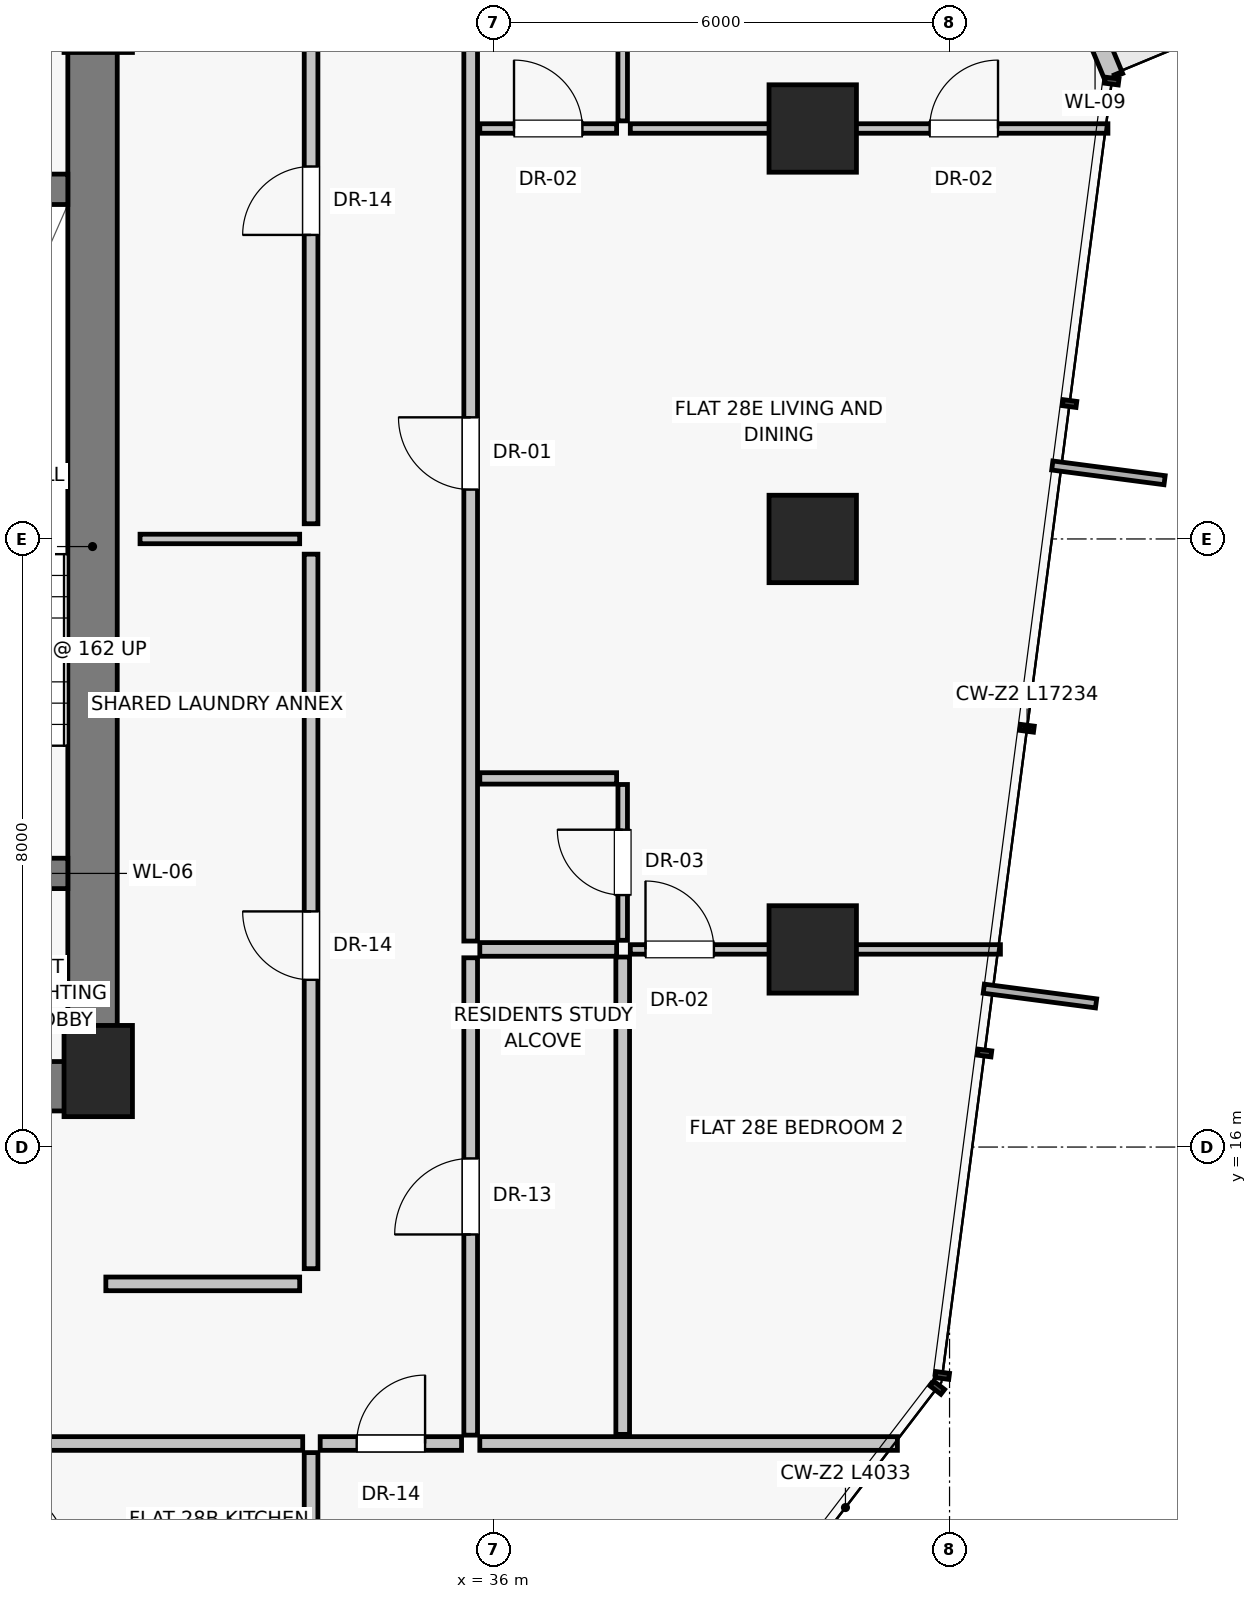
"""IFC4 building model, lengths in metres.
Left out: names, types, materials, properties, quantities, classifications, styles, units other than length and angle.
Written with IfcOpenShell. Run it as: python <this file> out.ifc"""

import sys

from ifc_helpers import new_model, si_unit, direction, frame, frame_2d, origin, origin_2d, place, context, subcontext, project, spatial, rectangle, extrude, source, transform, mapped, element, fill, save


model = new_model("IFC4")
c1 = context("Model", 3, precision=1e-05, world=origin(), true_north=direction((0.0, 1.0)))
c2 = subcontext(c1, "Body", "Model", "MODEL_VIEW")
j1 = project(units=[si_unit("LENGTHUNIT", "METRE"), si_unit("PLANEANGLEUNIT", "RADIAN")], contexts=[c1])
p1 = place(None, origin())
s1 = spatial("IfcSite", under=j1, at=p1, CompositionType="ELEMENT")
p2 = place(p1, origin())
s2 = spatial("IfcBuilding", under=s1, at=p2, CompositionType="ELEMENT")
p3 = place(p2, frame((0.0, 0.0, 102.45)))
s3 = spatial("IfcBuildingStorey", under=s2, at=p3, CompositionType="ELEMENT", Elevation=102.45)
p4 = place(p3, frame((30.8, 17.0, 0.0), z_axis=(0.0, 0.0, 1.0), x_axis=(1.0, 0.0, 0.0)))
e1 = element("IfcColumn", 1, at=p4, inside=s3, PredefinedType="PILASTER", context=c2, shape_type="SweptSolid", body=[
    extrude(rectangle(XDim=0.9, YDim=1.2, at=origin_2d()), origin(), (0.0, 0.0, 1.0), 3.25),
])
for number, where, z_axis, x_axis in (
    (2, (40.2, 18.6, 0.0), (0.0, 0.0, 1.0), (1.0, 0.0, 0.0)),
    (3, (40.2, 24.0, 0.0), (0.0, 0.0, 1.0), (1.0, 0.0, 0.0)),
    (4, (40.2, 29.4, 0.0), (0.0, 0.0, 1.0), (1.0, 0.0, 0.0)),
):
    element("IfcColumn", number, at=place(p3, frame(where, z_axis=z_axis, x_axis=x_axis)), inside=s3, PredefinedType="COLUMN", context=c2, shape_type="SweptSolid", body=[
        extrude(rectangle(XDim=1.15, YDim=1.15, at=origin_2d()), origin(), (0.0, 0.0, 1.0), 3.25),
    ])
p5 = place(p3, frame((44.162, 30.076, 0.0), z_axis=(0.0, 0.0, 1.0), x_axis=(-0.383361891247, 0.923598213694, 0.0)))
e5 = element("IfcWall", 5, at=p5, inside=s3, PredefinedType="SOLIDWALL", context=c2, shape_type="SweptSolid", body=[
    extrude(rectangle(XDim=4.233, YDim=0.25, at=frame_2d((2.117, 0.0))), origin(), (0.0, 0.0, 1.0), 3.0),
])
p6 = place(p5, frame((1.542, 0.0, 0.0)))
e6 = element("IfcOpeningElement", 6, at=p6, cuts=e5, PredefinedType="OPENING", context=c2, shape_type="SweptSolid", body=[
    extrude(rectangle(XDim=1.15, YDim=2.25, at=frame_2d((0.575, 1.125))), frame((0.0, 0.135, 0.0), z_axis=(0.0, -1.0, 0.0), x_axis=(1.0, 0.0, 0.0)), (0.0, 0.0, 1.0), 0.27),
])
p7 = place(p3, frame((30.725, 16.8, 0.0), z_axis=(0.0, 0.0, 1.0), x_axis=(0.0, 1.0, 0.0)))
e7 = element("IfcWall", 7, at=p7, inside=s3, PredefinedType="SHEAR", context=c2, shape_type="SweptSolid", body=[
    extrude(rectangle(XDim=14.2, YDim=0.65, at=frame_2d((7.1, 0.0))), origin(), (0.0, 0.0, 1.0), 3.0),
])
p8 = place(p3, frame((24.95, 16.8, 0.0), z_axis=(0.0, 0.0, 1.0), x_axis=(1.0, 0.0, 0.0)))
e8 = element("IfcWall", 8, at=p8, inside=s3, PredefinedType="SHEAR", context=c2, shape_type="SweptSolid", body=[
    extrude(rectangle(XDim=5.85, YDim=0.65, at=frame_2d((2.925, 0.0))), origin(), (0.0, 0.0, 1.0), 3.0),
])
p9 = place(p8, frame((2.15, 0.0, 0.0)))
e9 = element("IfcOpeningElement", 9, at=p9, cuts=e8, PredefinedType="OPENING", context=c2, shape_type="SweptSolid", body=[
    extrude(rectangle(XDim=1.2, YDim=2.03, at=frame_2d((0.6, 1.015))), frame((0.0, 0.335, 0.0), z_axis=(0.0, -1.0, 0.0), x_axis=(1.0, 0.0, 0.0)), (0.0, 0.0, 1.0), 0.67),
])
p10 = place(p3, frame((27.0, 19.6, 0.0), z_axis=(0.0, 0.0, 1.0), x_axis=(1.0, 0.0, 0.0)))
e10 = element("IfcWall", 10, at=p10, inside=s3, PredefinedType="SHEAR", context=c2, shape_type="SweptSolid", body=[
    extrude(rectangle(XDim=3.4, YDim=0.4, at=frame_2d((1.7, 0.0))), origin(), (0.0, 0.0, 1.0), 3.0),
])
p11 = place(p10, frame((1.05, 0.0, 0.0)))
e11 = element("IfcOpeningElement", 11, at=p11, cuts=e10, PredefinedType="OPENING", context=c2, shape_type="SweptSolid", body=[
    extrude(rectangle(XDim=1.1, YDim=2.03, at=frame_2d((0.55, 1.015))), frame((0.0, 0.21, 0.0), z_axis=(0.0, -1.0, 0.0), x_axis=(1.0, 0.0, 0.0)), (0.0, 0.0, 1.0), 0.42),
])
p12 = place(p3, frame((27.0, 28.6, 0.0), z_axis=(0.0, 0.0, 1.0), x_axis=(1.0, 0.0, 0.0)))
e12 = element("IfcWall", 12, at=p12, inside=s3, PredefinedType="SHEAR", context=c2, shape_type="SweptSolid", body=[
    extrude(rectangle(XDim=3.4, YDim=0.4, at=frame_2d((1.7, 0.0))), origin(), (0.0, 0.0, 1.0), 3.0),
])
p13 = place(p3, frame((33.6, 14.4, 0.0), z_axis=(0.0, 0.0, 1.0), x_axis=(0.0, 1.0, 0.0)))
e13 = element("IfcWall", 13, at=p13, inside=s3, PredefinedType="PARTITIONING", context=c2, shape_type="SweptSolid", body=[
    extrude(rectangle(XDim=9.4, YDim=0.18, at=frame_2d((4.7, 0.0))), origin(), (0.0, 0.0, 1.0), 3.0),
])
p14 = place(p13, frame((3.8, 0.0, 0.0)))
e14 = element("IfcOpeningElement", 14, at=p14, cuts=e13, PredefinedType="OPENING", context=c2, shape_type="SweptSolid", body=[
    extrude(rectangle(XDim=0.9, YDim=2.01, at=frame_2d((0.45, 1.005))), frame((0.0, 0.1, 0.0), z_axis=(0.0, -1.0, 0.0), x_axis=(1.0, 0.0, 0.0)), (0.0, 0.0, 1.0), 0.2),
])
p15 = place(p3, frame((33.6, 24.2, 0.0), z_axis=(0.0, 0.0, 1.0), x_axis=(0.0, 1.0, 0.0)))
e15 = element("IfcWall", 15, at=p15, inside=s3, PredefinedType="PARTITIONING", context=c2, shape_type="SweptSolid", body=[
    extrude(rectangle(XDim=9.2, YDim=0.18, at=frame_2d((4.6, 0.0))), origin(), (0.0, 0.0, 1.0), 3.0),
])
p16 = place(p15, frame((3.8, 0.0, 0.0)))
e16 = element("IfcOpeningElement", 16, at=p16, cuts=e15, PredefinedType="OPENING", context=c2, shape_type="SweptSolid", body=[
    extrude(rectangle(XDim=0.9, YDim=2.01, at=frame_2d((0.45, 1.005))), frame((0.0, 0.1, 0.0), z_axis=(0.0, -1.0, 0.0), x_axis=(1.0, 0.0, 0.0)), (0.0, 0.0, 1.0), 0.2),
])
p17 = place(p3, frame((31.35, 24.0, 0.0), z_axis=(0.0, 0.0, 1.0), x_axis=(1.0, 0.0, 0.0)))
e17 = element("IfcWall", 17, at=p17, inside=s3, PredefinedType="PARTITIONING", context=c2, shape_type="SweptSolid", body=[
    extrude(rectangle(XDim=2.1, YDim=0.125, at=frame_2d((1.05, 0.0))), origin(), (0.0, 0.0, 1.0), 3.0),
])
p18 = place(p3, frame((30.9, 14.2, 0.0), z_axis=(0.0, 0.0, 1.0), x_axis=(1.0, 0.0, 0.0)))
e18 = element("IfcWall", 18, at=p18, inside=s3, PredefinedType="PARTITIONING", context=c2, shape_type="SweptSolid", body=[
    extrude(rectangle(XDim=2.55, YDim=0.18, at=frame_2d((1.275, 0.0))), origin(), (0.0, 0.0, 1.0), 3.0),
])
p19 = place(p3, frame((33.6, 11.98, 0.0), z_axis=(0.0, 0.0, 1.0), x_axis=(0.0, -1.0, 0.0)))
e19 = element("IfcWall", 19, at=p19, inside=s3, PredefinedType="PARTITIONING", context=c2, shape_type="SweptSolid", body=[
    extrude(rectangle(XDim=4.797, YDim=0.18, at=frame_2d((2.398, 0.0))), origin(), (0.0, 0.0, 1.0), 3.0),
])
p20 = place(p3, frame((24.754, 12.1, 0.0), z_axis=(0.0, 0.0, 1.0), x_axis=(1.0, 0.0, 0.0)))
e20 = element("IfcWall", 20, at=p20, inside=s3, PredefinedType="PARTITIONING", context=c2, shape_type="SweptSolid", body=[
    extrude(rectangle(XDim=8.736, YDim=0.18, at=frame_2d((4.368, 0.0))), origin(), (0.0, 0.0, 1.0), 2.58),
])
p21 = place(p20, frame((2.958, 0.0, 0.0)))
e21 = element("IfcOpeningElement", 21, at=p21, cuts=e20, PredefinedType="OPENING", context=c2, shape_type="SweptSolid", body=[
    extrude(rectangle(XDim=0.95, YDim=2.02, at=frame_2d((0.475, 1.01))), frame((0.0, 0.1, 0.0), z_axis=(0.0, -1.0, 0.0), x_axis=(1.0, 0.0, 0.0)), (0.0, 0.0, 1.0), 0.2),
])
p22 = place(p3, frame((35.82, 12.1, 0.0), z_axis=(0.0, 0.0, 1.0), x_axis=(1.0, 0.0, 0.0)))
e22 = element("IfcWall", 22, at=p22, inside=s3, PredefinedType="PARTITIONING", context=c2, shape_type="SweptSolid", body=[
    extrude(rectangle(XDim=5.494, YDim=0.18, at=frame_2d((2.747, 0.0))), origin(), (0.0, 0.0, 1.0), 3.0),
])
p23 = place(p3, frame((35.7, 12.21, 0.0), z_axis=(0.0, 0.0, 1.0), x_axis=(0.0, 1.0, 0.0)))
e23 = element("IfcWall", 23, at=p23, inside=s3, PredefinedType="PARTITIONING", context=c2, shape_type="SweptSolid", body=[
    extrude(rectangle(XDim=6.28, YDim=0.18, at=frame_2d((3.14, 0.0))), origin(), (0.0, 0.0, 1.0), 2.58),
])
p24 = place(p23, frame((2.64, 0.0, 0.0)))
e24 = element("IfcOpeningElement", 24, at=p24, cuts=e23, PredefinedType="OPENING", context=c2, shape_type="SweptSolid", body=[
    extrude(rectangle(XDim=1.0, YDim=2.01, at=frame_2d((0.5, 1.005))), frame((0.0, 0.1, 0.0), z_axis=(0.0, -1.0, 0.0), x_axis=(1.0, 0.0, 0.0)), (0.0, 0.0, 1.0), 0.2),
])
p25 = place(p3, frame((35.7, 18.71, 0.0), z_axis=(0.0, 0.0, 1.0), x_axis=(0.0, 1.0, 0.0)))
e25 = element("IfcWall", 25, at=p25, inside=s3, PredefinedType="PARTITIONING", context=c2, shape_type="SweptSolid", body=[
    extrude(rectangle(XDim=16.88, YDim=0.18, at=frame_2d((8.44, 0.0))), origin(), (0.0, 0.0, 1.0), 2.58),
])
p26 = place(p25, frame((5.94, 0.0, 0.0)))
e26 = element("IfcOpeningElement", 26, at=p26, cuts=e25, PredefinedType="OPENING", context=c2, shape_type="SweptSolid", body=[
    extrude(rectangle(XDim=0.95, YDim=2.02, at=frame_2d((0.475, 1.01))), frame((0.0, 0.1, 0.0), z_axis=(0.0, -1.0, 0.0), x_axis=(1.0, 0.0, 0.0)), (0.0, 0.0, 1.0), 0.2),
])
p27 = place(p3, frame((37.7, 12.22, 0.0), z_axis=(0.0, 0.0, 1.0), x_axis=(0.0, 1.0, 0.0)))
e27 = element("IfcWall", 27, at=p27, inside=s3, PredefinedType="PARTITIONING", context=c2, shape_type="SweptSolid", body=[
    extrude(rectangle(XDim=6.28, YDim=0.18, at=frame_2d((3.14, 0.0))), origin(), (0.0, 0.0, 1.0), 3.0),
])
p28 = place(p3, frame((35.82, 18.6, 0.0), z_axis=(0.0, 0.0, 1.0), x_axis=(1.0, 0.0, 0.0)))
e28 = element("IfcWall", 28, at=p28, inside=s3, PredefinedType="PARTITIONING", context=c2, shape_type="SweptSolid", body=[
    extrude(rectangle(XDim=1.8, YDim=0.18, at=frame_2d((0.9, 0.0))), origin(), (0.0, 0.0, 1.0), 2.378),
])
p29 = place(p3, frame((37.8, 18.6, 0.0), z_axis=(0.0, 0.0, 1.0), x_axis=(1.0, 0.0, 0.0)))
e29 = element("IfcWall", 29, at=p29, inside=s3, PredefinedType="PARTITIONING", context=c2, shape_type="SweptSolid", body=[
    extrude(rectangle(XDim=4.869, YDim=0.125, at=frame_2d((2.435, 0.0))), origin(), (0.0, 0.0, 1.0), 2.378),
])
p30 = place(p29, frame((0.2, 0.0, 0.0)))
e30 = element("IfcOpeningElement", 30, at=p30, cuts=e29, PredefinedType="OPENING", context=c2, shape_type="SweptSolid", body=[
    extrude(rectangle(XDim=0.9, YDim=2.01, at=frame_2d((0.45, 1.005))), frame((0.0, 0.073, 0.0), z_axis=(0.0, -1.0, 0.0), x_axis=(1.0, 0.0, 0.0)), (0.0, 0.0, 1.0), 0.145),
])
p31 = place(p3, frame((35.82, 20.85, 0.0), z_axis=(0.0, 0.0, 1.0), x_axis=(1.0, 0.0, 0.0)))
e31 = element("IfcWall", 31, at=p31, inside=s3, PredefinedType="PARTITIONING", context=c2, shape_type="SweptSolid", body=[
    extrude(rectangle(XDim=1.8, YDim=0.15, at=frame_2d((0.9, 0.0))), origin(), (0.0, 0.0, 1.0), 3.0),
])
p32 = place(p3, frame((37.7, 18.72, 0.0), z_axis=(0.0, 0.0, 1.0), x_axis=(0.0, 1.0, 0.0)))
e32 = element("IfcWall", 32, at=p32, inside=s3, PredefinedType="PARTITIONING", context=c2, shape_type="SweptSolid", body=[
    extrude(rectangle(XDim=2.05, YDim=0.125, at=frame_2d((1.025, 0.0))), origin(), (0.0, 0.0, 1.0), 3.0),
])
p33 = place(p32, frame((0.595, 0.0, 0.0)))
e33 = element("IfcOpeningElement", 33, at=p33, cuts=e32, PredefinedType="OPENING", context=c2, shape_type="SweptSolid", body=[
    extrude(rectangle(XDim=0.86, YDim=2.01, at=frame_2d((0.43, 1.005))), frame((0.0, 0.073, 0.0), z_axis=(0.0, -1.0, 0.0), x_axis=(1.0, 0.0, 0.0)), (0.0, 0.0, 1.0), 0.145),
])
p34 = place(p3, frame((35.82, 29.4, 0.0), z_axis=(0.0, 0.0, 1.0), x_axis=(1.0, 0.0, 0.0)))
e34 = element("IfcWall", 34, at=p34, inside=s3, PredefinedType="PARTITIONING", context=c2, shape_type="SweptSolid", body=[
    extrude(rectangle(XDim=1.8, YDim=0.125, at=frame_2d((0.9, 0.0))), origin(), (0.0, 0.0, 1.0), 2.378),
])
p35 = place(p34, frame((0.45, 0.0, 0.0)))
e35 = element("IfcOpeningElement", 35, at=p35, cuts=e34, PredefinedType="OPENING", context=c2, shape_type="SweptSolid", body=[
    extrude(rectangle(XDim=0.9, YDim=2.01, at=frame_2d((0.45, 1.005))), frame((0.0, 0.073, 0.0), z_axis=(0.0, -1.0, 0.0), x_axis=(1.0, 0.0, 0.0)), (0.0, 0.0, 1.0), 0.145),
])
p36 = place(p3, frame((37.7, 29.5, 0.0), z_axis=(0.0, 0.0, 1.0), x_axis=(0.0, 1.0, 0.0)))
e36 = element("IfcWall", 36, at=p36, inside=s3, PredefinedType="PARTITIONING", context=c2, shape_type="SweptSolid", body=[
    extrude(rectangle(XDim=6.08, YDim=0.125, at=frame_2d((3.04, 0.0))), origin(), (0.0, 0.0, 1.0), 3.0),
])
p37 = place(p3, frame((37.8, 29.4, 0.0), z_axis=(0.0, 0.0, 1.0), x_axis=(1.0, 0.0, 0.0)))
e37 = element("IfcWall", 37, at=p37, inside=s3, PredefinedType="PARTITIONING", context=c2, shape_type="SweptSolid", body=[
    extrude(rectangle(XDim=6.283, YDim=0.125, at=frame_2d((3.142, 0.0))), origin(), (0.0, 0.0, 1.0), 2.378),
])
p38 = place(p37, frame((3.938, 0.0, 0.0)))
e38 = element("IfcOpeningElement", 38, at=p38, cuts=e37, PredefinedType="OPENING", context=c2, shape_type="SweptSolid", body=[
    extrude(rectangle(XDim=0.9, YDim=2.01, at=frame_2d((0.45, 1.005))), frame((0.0, 0.073, 0.0), z_axis=(0.0, -1.0, 0.0), x_axis=(1.0, 0.0, 0.0)), (0.0, 0.0, 1.0), 0.145),
])
p39 = place(p3, frame((33.72, 12.1, 0.0), z_axis=(0.0, 0.0, 1.0), x_axis=(1.0, 0.0, 0.0)))
e39 = element("IfcWall", 39, at=p39, inside=s3, PredefinedType="PARTITIONING", context=c2, shape_type="SweptSolid", body=[
    extrude(rectangle(XDim=1.86, YDim=0.18, at=frame_2d((0.93, 0.0))), origin(), (0.0, 0.0, 1.0), 3.0),
])
p40 = place(p39, frame((0.48, 0.0, 0.0)))
e40 = element("IfcOpeningElement", 40, at=p40, cuts=e39, PredefinedType="OPENING", context=c2, shape_type="SweptSolid", body=[
    extrude(rectangle(XDim=0.9, YDim=2.01, at=frame_2d((0.45, 1.005))), frame((0.0, 0.1, 0.0), z_axis=(0.0, -1.0, 0.0), x_axis=(1.0, 0.0, 0.0)), (0.0, 0.0, 1.0), 0.2),
])
m1 = source(origin(), c2, "Body", "SweptSolid", [
    extrude(rectangle(XDim=0.9, YDim=2.01, at=frame_2d((0.45, 1.005))), frame((0.0, 0.025, 0.0), z_axis=(0.0, -1.0, 0.0), x_axis=(1.0, 0.0, 0.0)), (0.0, 0.0, 1.0), 0.05),
])
p41 = place(p14, origin())
e41 = element("IfcDoor", 41, at=p41, inside=s3, OperationType="SINGLE_SWING_RIGHT", PredefinedType="DOOR", context=c2, shape_type="MappedRepresentation", body=[
    mapped(m1, transform((0.0, 0.0, 0.0), scale=1.0)),
])
fill(e14, e41)
p42 = place(p16, origin())
e42 = element("IfcDoor", 42, at=p42, inside=s3, OperationType="SINGLE_SWING_LEFT", PredefinedType="DOOR", context=c2, shape_type="MappedRepresentation", body=[
    mapped(m1, transform((0.0, 0.0, 0.0), scale=1.0)),
])
fill(e16, e42)
m2 = source(origin(), c2, "Body", "SweptSolid", [
    extrude(rectangle(XDim=1.0, YDim=2.01, at=frame_2d((0.5, 1.005))), frame((0.0, 0.025, 0.0), z_axis=(0.0, -1.0, 0.0), x_axis=(1.0, 0.0, 0.0)), (0.0, 0.0, 1.0), 0.05),
])
p43 = place(p24, origin())
e43 = element("IfcDoor", 43, at=p43, inside=s3, OperationType="SINGLE_SWING_LEFT", PredefinedType="DOOR", context=c2, shape_type="MappedRepresentation", body=[
    mapped(m2, transform((0.0, 0.0, 0.0), scale=1.0)),
])
fill(e24, e43)
m3 = source(origin(), c2, "Body", "SweptSolid", [
    extrude(rectangle(XDim=0.95, YDim=2.02, at=frame_2d((0.475, 1.01))), frame((0.0, 0.025, 0.0), z_axis=(0.0, -1.0, 0.0), x_axis=(1.0, 0.0, 0.0)), (0.0, 0.0, 1.0), 0.05),
])
p44 = place(p26, origin())
e44 = element("IfcDoor", 44, at=p44, inside=s3, OperationType="SINGLE_SWING_RIGHT", PredefinedType="DOOR", context=c2, shape_type="MappedRepresentation", body=[
    mapped(m3, transform((0.0, 0.0, 0.0), scale=1.0)),
])
fill(e26, e44)
p45 = place(p30, origin())
e45 = element("IfcDoor", 45, at=p45, inside=s3, OperationType="SINGLE_SWING_LEFT", PredefinedType="DOOR", context=c2, shape_type="MappedRepresentation", body=[
    mapped(m1, transform((0.0, 0.0, 0.0), scale=1.0)),
])
fill(e30, e45)
m4 = source(origin(), c2, "Body", "SweptSolid", [
    extrude(rectangle(XDim=0.86, YDim=2.01, at=frame_2d((0.43, 1.005))), frame((0.0, 0.025, 0.0), z_axis=(0.0, -1.0, 0.0), x_axis=(1.0, 0.0, 0.0)), (0.0, 0.0, 1.0), 0.05),
])
p46 = place(p33, origin())
e46 = element("IfcDoor", 46, at=p46, inside=s3, OperationType="SINGLE_SWING_RIGHT", PredefinedType="DOOR", context=c2, shape_type="MappedRepresentation", body=[
    mapped(m4, transform((0.0, 0.0, 0.0), scale=1.0)),
])
fill(e33, e46)
p47 = place(p35, origin())
e47 = element("IfcDoor", 47, at=p47, inside=s3, OperationType="SINGLE_SWING_LEFT", PredefinedType="DOOR", context=c2, shape_type="MappedRepresentation", body=[
    mapped(m1, transform((0.0, 0.0, 0.0), scale=1.0)),
])
fill(e35, e47)
p48 = place(p38, origin())
e48 = element("IfcDoor", 48, at=p48, inside=s3, OperationType="SINGLE_SWING_RIGHT", PredefinedType="DOOR", context=c2, shape_type="MappedRepresentation", body=[
    mapped(m1, transform((0.0, 0.0, 0.0), scale=1.0)),
])
fill(e38, e48)
p49 = place(p40, origin())
e49 = element("IfcDoor", 49, at=p49, inside=s3, OperationType="SINGLE_SWING_RIGHT", PredefinedType="DOOR", context=c2, shape_type="MappedRepresentation", body=[
    mapped(m1, transform((0.0, 0.0, 0.0), scale=1.0)),
])
fill(e40, e49)
save(model, sys.argv[1])
